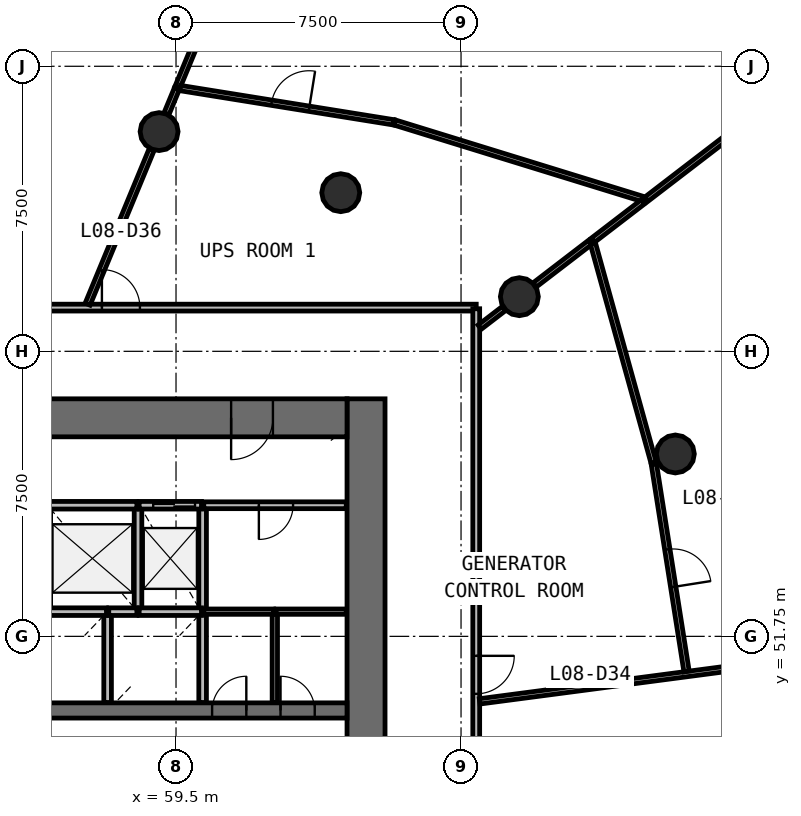
"""IFC4 building model, lengths in metres.
Left out: names, types, materials, properties, quantities, classifications, styles, units other than length and angle.
Written with IfcOpenShell. Run it as: python <this file> out.ifc"""

import sys

from ifc_helpers import new_model, si_unit, direction, frame, frame_2d, origin, origin_2d, place, context, subcontext, project, spatial, rectangle, circle, extrude, source, transform, mapped, element, fill, save


model = new_model("IFC4")
c1 = context("Model", 3, precision=1e-05, world=origin(), true_north=direction((0.0, 1.0)))
c2 = subcontext(c1, "Body", "Model", "MODEL_VIEW")
j1 = project(units=[si_unit("LENGTHUNIT", "METRE"), si_unit("PLANEANGLEUNIT", "RADIAN")], contexts=[c1])
p1 = place(None, origin())
s1 = spatial("IfcSite", under=j1, at=p1, CompositionType="ELEMENT")
p2 = place(p1, origin())
s2 = spatial("IfcBuilding", under=s1, at=p2, CompositionType="ELEMENT")
p3 = place(p2, frame((0.0, 0.0, 35.8)))
s3 = spatial("IfcBuildingStorey", under=s2, at=p3, CompositionType="ELEMENT", Elevation=35.8)
p4 = place(p3, frame((64.5, 38.0, 0.0), z_axis=(0.0, 0.0, 1.0), x_axis=(0.0, 1.0, 0.0)))
e1 = element("IfcWall", 1, at=p4, inside=s3, PredefinedType="SHEAR", context=c2, shape_type="SweptSolid", body=[
    extrude(rectangle(XDim=20.0, YDim=1.0, at=frame_2d((10.0, 0.0))), origin(), (0.0, 0.0, 1.0), 4.4),
])
p5 = place(p4, frame((9.1, 0.0, 0.0)))
e2 = element("IfcOpeningElement", 2, at=p5, cuts=e1, PredefinedType="OPENING", context=c2, shape_type="SweptSolid", body=[
    extrude(rectangle(XDim=1.8, YDim=2.1, at=frame_2d((0.9, 1.05))), frame((0.0, 0.51, 0.0), z_axis=(0.0, -1.0, 0.0), x_axis=(1.0, 0.0, 0.0)), (0.0, 0.0, 1.0), 1.02),
])
p6 = place(p3, frame((64.0, 57.5, 0.0), z_axis=(0.0, 0.0, 1.0), x_axis=(-1.0, 0.0, 0.0)))
e3 = element("IfcWall", 3, at=p6, inside=s3, PredefinedType="SHEAR", context=c2, shape_type="SweptSolid", body=[
    extrude(rectangle(XDim=24.0, YDim=1.0, at=frame_2d((12.0, 0.0))), origin(), (0.0, 0.0, 1.0), 4.4),
])
p7 = place(p6, frame((21.45, 0.0, 0.0)))
e4 = element("IfcOpeningElement", 4, at=p7, cuts=e3, PredefinedType="OPENING", context=c2, shape_type="SweptSolid", body=[
    extrude(rectangle(XDim=1.1, YDim=2.1, at=frame_2d((0.55, 1.05))), frame((0.0, 0.51, 0.0), z_axis=(0.0, -1.0, 0.0), x_axis=(1.0, 0.0, 0.0)), (0.0, 0.0, 1.0), 1.02),
])
p8 = place(p6, frame((1.95, 0.0, 0.0)))
e5 = element("IfcOpeningElement", 5, at=p8, cuts=e3, PredefinedType="OPENING", context=c2, shape_type="SweptSolid", body=[
    extrude(rectangle(XDim=1.1, YDim=2.1, at=frame_2d((0.55, 1.05))), frame((0.0, 0.51, 0.0), z_axis=(0.0, -1.0, 0.0), x_axis=(1.0, 0.0, 0.0)), (0.0, 0.0, 1.0), 1.02),
])
p9 = place(p3, frame((40.0, 49.8, 0.0), z_axis=(0.0, 0.0, 1.0), x_axis=(1.0, 0.0, 0.0)))
e6 = element("IfcWall", 6, at=p9, inside=s3, PredefinedType="SHEAR", context=c2, shape_type="SweptSolid", body=[
    extrude(rectangle(XDim=24.0, YDim=0.4, at=frame_2d((12.0, 0.0))), origin(), (0.0, 0.0, 1.0), 4.4),
])
p10 = place(p9, frame((4.5, 0.0, 0.0)))
e7 = element("IfcOpeningElement", 7, at=p10, cuts=e6, PredefinedType="OPENING", context=c2, shape_type="SweptSolid", body=[
    extrude(rectangle(XDim=1.1, YDim=2.1, at=frame_2d((0.55, 1.05))), frame((0.0, 0.21, 0.0), z_axis=(0.0, -1.0, 0.0), x_axis=(1.0, 0.0, 0.0)), (0.0, 0.0, 1.0), 0.42),
])
p11 = place(p9, frame((7.0, 0.0, 0.0)))
e8 = element("IfcOpeningElement", 8, at=p11, cuts=e6, PredefinedType="OPENING", context=c2, shape_type="SweptSolid", body=[
    extrude(rectangle(XDim=1.1, YDim=2.1, at=frame_2d((0.55, 1.05))), frame((0.0, 0.21, 0.0), z_axis=(0.0, -1.0, 0.0), x_axis=(1.0, 0.0, 0.0)), (0.0, 0.0, 1.0), 0.42),
])
p12 = place(p9, frame((9.5, 0.0, 0.0)))
e9 = element("IfcOpeningElement", 9, at=p12, cuts=e6, PredefinedType="OPENING", context=c2, shape_type="SweptSolid", body=[
    extrude(rectangle(XDim=1.1, YDim=2.1, at=frame_2d((0.55, 1.05))), frame((0.0, 0.21, 0.0), z_axis=(0.0, -1.0, 0.0), x_axis=(1.0, 0.0, 0.0)), (0.0, 0.0, 1.0), 0.42),
])
p13 = place(p9, frame((0.9, 0.0, 0.0)))
e10 = element("IfcOpeningElement", 10, at=p13, cuts=e6, PredefinedType="OPENING", context=c2, shape_type="SweptSolid", body=[
    extrude(rectangle(XDim=1.8, YDim=2.4, at=frame_2d((0.9, 1.2))), frame((0.0, 0.21, 0.0), z_axis=(0.0, -1.0, 0.0), x_axis=(1.0, 0.0, 0.0)), (0.0, 0.0, 1.0), 0.42),
])
p14 = place(p9, frame((20.45, 0.0, 0.0)))
e11 = element("IfcOpeningElement", 11, at=p14, cuts=e6, PredefinedType="OPENING", context=c2, shape_type="SweptSolid", body=[
    extrude(rectangle(XDim=0.9, YDim=2.1, at=frame_2d((0.45, 1.05))), frame((0.0, 0.21, 0.0), z_axis=(0.0, -1.0, 0.0), x_axis=(1.0, 0.0, 0.0)), (0.0, 0.0, 1.0), 0.42),
])
p15 = place(p9, frame((22.25, 0.0, 0.0)))
e12 = element("IfcOpeningElement", 12, at=p15, cuts=e6, PredefinedType="OPENING", context=c2, shape_type="SweptSolid", body=[
    extrude(rectangle(XDim=0.9, YDim=2.1, at=frame_2d((0.45, 1.05))), frame((0.0, 0.21, 0.0), z_axis=(0.0, -1.0, 0.0), x_axis=(1.0, 0.0, 0.0)), (0.0, 0.0, 1.0), 0.42),
])
p16 = place(p9, frame((11.65, 0.0, 0.0)))
e13 = element("IfcOpeningElement", 13, at=p16, cuts=e6, PredefinedType="OPENING", context=c2, shape_type="SweptSolid", body=[
    extrude(rectangle(XDim=0.9, YDim=2.1, at=frame_2d((0.45, 1.05))), frame((0.0, 0.21, 0.0), z_axis=(0.0, -1.0, 0.0), x_axis=(1.0, 0.0, 0.0)), (0.0, 0.0, 1.0), 0.42),
])
m1 = source(origin(), c2, "Body", "SweptSolid", [
    extrude(circle(Radius=0.5, at=origin_2d()), origin(), (0.0, 0.0, 1.0), 4.4),
])
for number, where, z_axis, x_axis in (
    (14, (72.639, 56.549, 0.0), (0.0, 0.0, 1.0), (1.0, 0.0, 0.0)),
    (15, (68.535, 60.688, 0.0), (0.0, 0.0, 1.0), (1.0, 0.0, 0.0)),
    (16, (63.835, 63.424, 0.0), (0.0, 0.0, 1.0), (1.0, 0.0, 0.0)),
    (17, (59.055, 65.031, 0.0), (0.0, 0.0, 1.0), (1.0, 0.0, 0.0)),
):
    element("IfcColumn", number, at=place(p3, frame(where, z_axis=z_axis, x_axis=x_axis)), inside=s3, PredefinedType="COLUMN", context=c2, shape_type="MappedRepresentation", body=[
        mapped(m1, transform((0.0, 0.0, 0.0), scale=1.0)),
    ])
for number, where, z_axis, x_axis in (
    (18, (58.5, 52.4, 0.0), (0.0, 0.0, 1.0), (0.0, 1.0, 0.0)),
    (19, (60.2, 52.4, 0.0), (0.0, 0.0, 1.0), (0.0, 1.0, 0.0)),
):
    element("IfcWall", number, at=place(p3, frame(where, z_axis=z_axis, x_axis=x_axis)), inside=s3, PredefinedType="SOLIDWALL", context=c2, shape_type="SweptSolid", body=[
        extrude(rectangle(XDim=2.8, YDim=0.2, at=frame_2d((1.4, 0.0))), origin(), (0.0, 0.0, 1.0), 3.95),
    ])
p17 = place(p3, frame((58.47, 55.2, 0.0), z_axis=(0.0, 0.0, 1.0), x_axis=(-1.0, 0.0, 0.0)))
e20 = element("IfcWall", 20, at=p17, inside=s3, PredefinedType="SOLIDWALL", context=c2, shape_type="SweptSolid", body=[
    extrude(rectangle(XDim=2.34, YDim=0.2, at=frame_2d((1.17, 0.0))), origin(), (0.0, 0.0, 1.0), 3.95),
])
p18 = place(p3, frame((57.7, 50.01, 0.0), z_axis=(0.0, 0.0, 1.0), x_axis=(0.0, 1.0, 0.0)))
e21 = element("IfcWall", 21, at=p18, inside=s3, PredefinedType="SOLIDWALL", context=c2, shape_type="SweptSolid", body=[
    extrude(rectangle(XDim=2.39, YDim=0.2, at=frame_2d((1.195, 0.0))), origin(), (0.0, 0.0, 1.0), 3.95),
])
p19 = place(p3, frame((60.2, 50.01, 0.0), z_axis=(0.0, 0.0, 1.0), x_axis=(0.0, 1.0, 0.0)))
e22 = element("IfcWall", 22, at=p19, inside=s3, PredefinedType="SOLIDWALL", context=c2, shape_type="SweptSolid", body=[
    extrude(rectangle(XDim=2.36, YDim=0.2, at=frame_2d((1.18, 0.0))), origin(), (0.0, 0.0, 1.0), 3.95),
])
p20 = place(p3, frame((60.17, 52.4, 0.0), z_axis=(0.0, 0.0, 1.0), x_axis=(-1.0, 0.0, 0.0)))
e23 = element("IfcWall", 23, at=p20, inside=s3, PredefinedType="SOLIDWALL", context=c2, shape_type="SweptSolid", body=[
    extrude(rectangle(XDim=1.64, YDim=0.2, at=frame_2d((0.82, 0.0))), origin(), (0.0, 0.0, 1.0), 3.95),
])
p21 = place(p3, frame((60.17, 55.2, 0.0), z_axis=(0.0, 0.0, 1.0), x_axis=(-1.0, 0.0, 0.0)))
e24 = element("IfcWall", 24, at=p21, inside=s3, PredefinedType="SOLIDWALL", context=c2, shape_type="SweptSolid", body=[
    extrude(rectangle(XDim=1.64, YDim=0.2, at=frame_2d((0.82, 0.0))), origin(), (0.0, 0.0, 1.0), 3.95),
])
p22 = place(p21, frame((0.17, 0.0, 0.0)))
e25 = element("IfcOpeningElement", 25, at=p22, cuts=e24, PredefinedType="OPENING", context=c2, shape_type="SweptSolid", body=[
    extrude(rectangle(XDim=1.1, YDim=2.1, at=frame_2d((0.55, 1.05))), frame((0.0, 0.11, 0.0), z_axis=(0.0, -1.0, 0.0), x_axis=(1.0, 0.0, 0.0)), (0.0, 0.0, 1.0), 0.22),
])
p23 = place(p3, frame((57.67, 52.4, 0.0), z_axis=(0.0, 0.0, 1.0), x_axis=(-1.0, 0.0, 0.0)))
e26 = element("IfcWall", 26, at=p23, inside=s3, PredefinedType="SOLIDWALL", context=c2, shape_type="SweptSolid", body=[
    extrude(rectangle(XDim=1.54, YDim=0.2, at=frame_2d((0.77, 0.0))), origin(), (0.0, 0.0, 1.0), 3.95),
])
p24 = place(p3, frame((58.47, 52.4, 0.0), z_axis=(0.0, 0.0, 1.0), x_axis=(-1.0, 0.0, 0.0)))
e27 = element("IfcWall", 27, at=p24, inside=s3, PredefinedType="SOLIDWALL", context=c2, shape_type="SweptSolid", body=[
    extrude(rectangle(XDim=0.74, YDim=0.2, at=frame_2d((0.37, 0.0))), origin(), (0.0, 0.0, 1.0), 3.95),
])
p25 = place(p3, frame((36.6, 60.4, 0.0), z_axis=(0.0, 0.0, 1.0), x_axis=(1.0, 0.0, 0.0)))
e28 = element("IfcWall", 28, at=p25, inside=s3, PredefinedType="PARTITIONING", context=c2, shape_type="SweptSolid", body=[
    extrude(rectangle(XDim=30.8, YDim=0.18, at=frame_2d((15.4, 0.0))), origin(), (0.0, 0.0, 1.0), 3.05),
])
p26 = place(p25, frame((20.95, 0.0, 0.0)))
e29 = element("IfcOpeningElement", 29, at=p26, cuts=e28, PredefinedType="OPENING", context=c2, shape_type="SweptSolid", body=[
    extrude(rectangle(XDim=1.0, YDim=2.1, at=frame_2d((0.5, 1.05))), frame((0.0, 0.1, 0.0), z_axis=(0.0, -1.0, 0.0), x_axis=(1.0, 0.0, 0.0)), (0.0, 0.0, 1.0), 0.2),
])
p27 = place(p25, frame((14.95, 0.0, 0.0)))
e30 = element("IfcOpeningElement", 30, at=p27, cuts=e28, PredefinedType="OPENING", context=c2, shape_type="SweptSolid", body=[
    extrude(rectangle(XDim=1.0, YDim=2.1, at=frame_2d((0.5, 1.05))), frame((0.0, 0.1, 0.0), z_axis=(0.0, -1.0, 0.0), x_axis=(1.0, 0.0, 0.0)), (0.0, 0.0, 1.0), 0.2),
])
p28 = place(p3, frame((67.4, 60.37, 0.0), z_axis=(0.0, 0.0, 1.0), x_axis=(0.0, -1.0, 0.0)))
e31 = element("IfcWall", 31, at=p28, inside=s3, PredefinedType="PARTITIONING", context=c2, shape_type="SweptSolid", body=[
    extrude(rectangle(XDim=23.583, YDim=0.18, at=frame_2d((11.791, 0.0))), origin(), (0.0, 0.0, 1.0), 3.05),
])
p29 = place(p28, frame((11.333, 0.0, 0.0)))
e32 = element("IfcOpeningElement", 32, at=p29, cuts=e31, PredefinedType="OPENING", context=c2, shape_type="SweptSolid", body=[
    extrude(rectangle(XDim=1.0, YDim=2.1, at=frame_2d((0.5, 1.05))), frame((0.0, 0.1, 0.0), z_axis=(0.0, -1.0, 0.0), x_axis=(1.0, 0.0, 0.0)), (0.0, 0.0, 1.0), 0.2),
])
p30 = place(p28, frame((9.133, 0.0, 0.0)))
e33 = element("IfcOpeningElement", 33, at=p30, cuts=e31, PredefinedType="OPENING", context=c2, shape_type="SweptSolid", body=[
    extrude(rectangle(XDim=1.0, YDim=2.1, at=frame_2d((0.5, 1.05))), frame((0.0, 0.1, 0.0), z_axis=(0.0, -1.0, 0.0), x_axis=(1.0, 0.0, 0.0)), (0.0, 0.0, 1.0), 0.2),
])
p31 = place(p3, frame((63.98, 55.2, 0.0), z_axis=(0.0, 0.0, 1.0), x_axis=(-1.0, 0.0, 0.0)))
e34 = element("IfcWall", 34, at=p31, inside=s3, PredefinedType="PARTITIONING", context=c2, shape_type="SweptSolid", body=[
    extrude(rectangle(XDim=3.75, YDim=0.18, at=frame_2d((1.875, 0.0))), origin(), (0.0, 0.0, 1.0), 3.95),
])
p32 = place(p31, frame((1.4, 0.0, 0.0)))
e35 = element("IfcOpeningElement", 35, at=p32, cuts=e34, PredefinedType="OPENING", context=c2, shape_type="SweptSolid", body=[
    extrude(rectangle(XDim=0.9, YDim=2.1, at=frame_2d((0.45, 1.05))), frame((0.0, 0.1, 0.0), z_axis=(0.0, -1.0, 0.0), x_axis=(1.0, 0.0, 0.0)), (0.0, 0.0, 1.0), 0.2),
])
p33 = place(p3, frame((59.534, 66.189, 0.0), z_axis=(0.0, 0.0, 1.0), x_axis=(0.382683346226, 0.923879568191, 0.0)))
e36 = element("IfcWall", 36, at=p33, inside=s3, PredefinedType="PARTITIONING", context=c2, shape_type="SweptSolid", body=[
    extrude(rectangle(XDim=8.411, YDim=0.14, at=frame_2d((4.206, 0.0))), origin(), (0.0, 0.0, 1.0), 3.05),
])
p34 = place(p3, frame((74.534, 50.967, 0.0), z_axis=(0.0, 0.0, 1.0), x_axis=(-0.99144622305, -0.130515848849, 0.0)))
e37 = element("IfcWall", 37, at=p34, inside=s3, PredefinedType="PARTITIONING", context=c2, shape_type="SweptSolid", body=[
    extrude(rectangle(XDim=7.104, YDim=0.14, at=frame_2d((3.552, 0.0))), origin(), (0.0, 0.0, 1.0), 3.05),
])
p35 = place(p3, frame((71.855, 63.236, 0.0), z_axis=(0.0, 0.0, 1.0), x_axis=(-0.955628382182, 0.294574939816, 0.0)))
e38 = element("IfcWall", 38, at=p35, inside=s3, PredefinedType="PARTITIONING", context=c2, shape_type="SweptSolid", body=[
    extrude(rectangle(XDim=6.91, YDim=0.14, at=frame_2d((3.455, 0.0))), origin(), (0.0, 0.0, 1.0), 3.05),
])
p36 = place(p3, frame((71.879, 63.254, 0.0), z_axis=(0.0, 0.0, 1.0), x_axis=(0.793367765852, 0.60874262879, 0.0)))
e39 = element("IfcWall", 39, at=p36, inside=s3, PredefinedType="PARTITIONING", context=c2, shape_type="SweptSolid", body=[
    extrude(rectangle(XDim=6.803, YDim=0.14, at=frame_2d((3.402, 0.0))), origin(), (0.0, 0.0, 1.0), 3.05),
])
p37 = place(p3, frame((72.069, 56.313, 0.0), z_axis=(0.0, 0.0, 1.0), x_axis=(-0.26694408294, 0.963712019528, 0.0)))
e40 = element("IfcWall", 40, at=p37, inside=s3, PredefinedType="PARTITIONING", context=c2, shape_type="SweptSolid", body=[
    extrude(rectangle(XDim=6.064, YDim=0.14, at=frame_2d((3.032, 0.0))), origin(), (0.0, 0.0, 1.0), 3.05),
])
p38 = place(p3, frame((59.605, 66.178, 0.0), z_axis=(0.0, 0.0, 1.0), x_axis=(0.987350770866, -0.158551112488, 0.0)))
e41 = element("IfcWall", 41, at=p38, inside=s3, PredefinedType="PARTITIONING", context=c2, shape_type="SweptSolid", body=[
    extrude(rectangle(XDim=5.69, YDim=0.14, at=frame_2d((2.845, 0.0))), origin(), (0.0, 0.0, 1.0), 3.05),
])
p39 = place(p38, frame((2.44, 0.0, 0.0)))
e42 = element("IfcOpeningElement", 42, at=p39, cuts=e41, PredefinedType="OPENING", context=c2, shape_type="SweptSolid", body=[
    extrude(rectangle(XDim=1.0, YDim=2.1, at=frame_2d((0.5, 1.05))), frame((0.0, 0.08, 0.0), z_axis=(0.0, -1.0, 0.0), x_axis=(1.0, 0.0, 0.0)), (0.0, 0.0, 1.0), 0.16),
])
p40 = place(p3, frame((72.074, 56.283, 0.0), z_axis=(0.0, 0.0, 1.0), x_axis=(0.155785554146, -0.987790899492, 0.0)))
e43 = element("IfcWall", 43, at=p40, inside=s3, PredefinedType="PARTITIONING", context=c2, shape_type="SweptSolid", body=[
    extrude(rectangle(XDim=5.524, YDim=0.14, at=frame_2d((2.762, 0.0))), origin(), (0.0, 0.0, 1.0), 3.05),
])
p41 = place(p40, frame((2.274, 0.0, 0.0)))
e44 = element("IfcOpeningElement", 44, at=p41, cuts=e43, PredefinedType="OPENING", context=c2, shape_type="SweptSolid", body=[
    extrude(rectangle(XDim=1.0, YDim=2.1, at=frame_2d((0.5, 1.05))), frame((0.0, 0.08, 0.0), z_axis=(0.0, -1.0, 0.0), x_axis=(1.0, 0.0, 0.0)), (0.0, 0.0, 1.0), 0.16),
])
p42 = place(p3, frame((57.174, 60.49, 0.0), z_axis=(0.0, 0.0, 1.0), x_axis=(0.382672831764, 0.923883923353, 0.0)))
e45 = element("IfcWall", 45, at=p42, inside=s3, PredefinedType="PARTITIONING", context=c2, shape_type="SweptSolid", body=[
    extrude(rectangle(XDim=4.41, YDim=0.14, at=frame_2d((2.205, 0.0))), origin(), (0.0, 0.0, 1.0), 3.05),
])
p43 = place(p3, frame((59.248, 65.498, 0.0), z_axis=(0.0, 0.0, 1.0), x_axis=(0.38261188646, 0.92390916455, 0.0)))
e46 = element("IfcWall", 46, at=p43, inside=s3, PredefinedType="PARTITIONING", context=c2, shape_type="SweptSolid", body=[
    extrude(rectangle(XDim=0.719, YDim=0.14, at=frame_2d((0.359, 0.0))), origin(), (0.0, 0.0, 1.0), 3.05),
])
p44 = place(p3, frame((62.1, 50.01, 0.0), z_axis=(0.0, 0.0, 1.0), x_axis=(0.0, 1.0, 0.0)))
e47 = element("IfcWall", 47, at=p44, inside=s3, PredefinedType="PARTITIONING", context=c2, shape_type="SweptSolid", body=[
    extrude(rectangle(XDim=2.39, YDim=0.14, at=frame_2d((1.195, 0.0))), origin(), (0.0, 0.0, 1.0), 3.05),
])
p45 = place(p3, frame((68.935, 60.995, 0.0), z_axis=(0.0, 0.0, 1.0), x_axis=(0.793340711993, 0.608777886174, 0.0)))
e48 = element("IfcWall", 48, at=p45, inside=s3, PredefinedType="PARTITIONING", context=c2, shape_type="SweptSolid", body=[
    extrude(rectangle(XDim=1.835, YDim=0.14, at=frame_2d((0.917, 0.0))), origin(), (0.0, 0.0, 1.0), 3.05),
])
p46 = place(p3, frame((62.07, 52.4, 0.0), z_axis=(0.0, 0.0, 1.0), x_axis=(-1.0, 0.0, 0.0)))
e49 = element("IfcWall", 49, at=p46, inside=s3, PredefinedType="PARTITIONING", context=c2, shape_type="SweptSolid", body=[
    extrude(rectangle(XDim=1.84, YDim=0.14, at=frame_2d((0.92, 0.0))), origin(), (0.0, 0.0, 1.0), 3.05),
])
p47 = place(p3, frame((63.98, 52.4, 0.0), z_axis=(0.0, 0.0, 1.0), x_axis=(-1.0, 0.0, 0.0)))
e50 = element("IfcWall", 50, at=p47, inside=s3, PredefinedType="PARTITIONING", context=c2, shape_type="SweptSolid", body=[
    extrude(rectangle(XDim=1.85, YDim=0.14, at=frame_2d((0.925, 0.0))), origin(), (0.0, 0.0, 1.0), 3.05),
])
p48 = place(p3, frame((70.474, 62.176, 0.0), z_axis=(0.0, 0.0, 1.0), x_axis=(0.793330865264, 0.608790717915, 0.0)))
e51 = element("IfcWall", 51, at=p48, inside=s3, PredefinedType="PARTITIONING", context=c2, shape_type="SweptSolid", body=[
    extrude(rectangle(XDim=1.655, YDim=0.14, at=frame_2d((0.828, 0.0))), origin(), (0.0, 0.0, 1.0), 3.05),
])
p49 = place(p3, frame((67.49, 59.886, 0.0), z_axis=(0.0, 0.0, 1.0), x_axis=(0.793316076519, 0.608809989025, 0.0)))
e52 = element("IfcWall", 52, at=p49, inside=s3, PredefinedType="PARTITIONING", context=c2, shape_type="SweptSolid", body=[
    extrude(rectangle(XDim=0.812, YDim=0.14, at=frame_2d((0.406, 0.0))), origin(), (0.0, 0.0, 1.0), 3.05),
])
m2 = source(origin(), c2, "Body", "SweptSolid", [
    extrude(rectangle(XDim=1.1, YDim=2.1, at=frame_2d((0.55, 1.05))), frame((0.0, 0.025, 0.0), z_axis=(0.0, -1.0, 0.0), x_axis=(1.0, 0.0, 0.0)), (0.0, 0.0, 1.0), 0.05),
])
p50 = place(p22, origin())
e53 = element("IfcDoor", 53, at=p50, inside=s3, OperationType="DOUBLE_DOOR_SLIDING", PredefinedType="USERDEFINED", context=c2, shape_type="MappedRepresentation", body=[
    mapped(m2, transform((0.0, 0.0, 0.0), scale=1.0)),
])
fill(e25, e53)
m3 = source(origin(), c2, "Body", "SweptSolid", [
    extrude(rectangle(XDim=1.1, YDim=2.1, at=frame_2d((0.55, 1.05))), frame((0.0, 0.025, 0.0), z_axis=(0.0, -1.0, 0.0), x_axis=(1.0, 0.0, 0.0)), (0.0, 0.0, 1.0), 0.05),
])
p51 = place(p8, origin())
e54 = element("IfcDoor", 54, at=p51, inside=s3, OperationType="SINGLE_SWING_RIGHT", PredefinedType="DOOR", context=c2, shape_type="MappedRepresentation", body=[
    mapped(m3, transform((0.0, 0.0, 0.0), scale=1.0)),
])
fill(e5, e54)
m4 = source(origin(), c2, "Body", "SweptSolid", [
    extrude(rectangle(XDim=1.0, YDim=2.1, at=frame_2d((0.5, 1.05))), frame((0.0, 0.025, 0.0), z_axis=(0.0, -1.0, 0.0), x_axis=(1.0, 0.0, 0.0)), (0.0, 0.0, 1.0), 0.05),
])
p52 = place(p30, origin())
e55 = element("IfcDoor", 55, at=p52, inside=s3, OperationType="SINGLE_SWING_LEFT", PredefinedType="DOOR", context=c2, shape_type="MappedRepresentation", body=[
    mapped(m4, transform((0.0, 0.0, 0.0), scale=1.0)),
])
fill(e33, e55)
p53 = place(p41, origin())
e56 = element("IfcDoor", 56, at=p53, inside=s3, OperationType="SINGLE_SWING_RIGHT", PredefinedType="DOOR", context=c2, shape_type="MappedRepresentation", body=[
    mapped(m4, transform((0.0, 0.0, 0.0), scale=1.0)),
])
fill(e44, e56)
p54 = place(p26, origin())
e57 = element("IfcDoor", 57, at=p54, inside=s3, OperationType="SINGLE_SWING_LEFT", PredefinedType="DOOR", context=c2, shape_type="MappedRepresentation", body=[
    mapped(m4, transform((0.0, 0.0, 0.0), scale=1.0)),
])
fill(e29, e57)
p55 = place(p39, origin())
e58 = element("IfcDoor", 58, at=p55, inside=s3, OperationType="SINGLE_SWING_RIGHT", PredefinedType="DOOR", context=c2, shape_type="MappedRepresentation", body=[
    mapped(m4, transform((0.0, 0.0, 0.0), scale=1.0)),
])
fill(e42, e58)
m5 = source(origin(), c2, "Body", "SweptSolid", [
    extrude(rectangle(XDim=0.9, YDim=2.1, at=frame_2d((0.45, 1.05))), frame((0.0, 0.025, 0.0), z_axis=(0.0, -1.0, 0.0), x_axis=(1.0, 0.0, 0.0)), (0.0, 0.0, 1.0), 0.05),
])
p56 = place(p14, origin())
e59 = element("IfcDoor", 59, at=p56, inside=s3, OperationType="SINGLE_SWING_RIGHT", PredefinedType="DOOR", context=c2, shape_type="MappedRepresentation", body=[
    mapped(m5, transform((0.0, 0.0, 0.0), scale=1.0)),
])
fill(e11, e59)
p57 = place(p15, origin())
e60 = element("IfcDoor", 60, at=p57, inside=s3, OperationType="SINGLE_SWING_LEFT", PredefinedType="DOOR", context=c2, shape_type="MappedRepresentation", body=[
    mapped(m5, transform((0.0, 0.0, 0.0), scale=1.0)),
])
fill(e12, e60)
p58 = place(p32, origin())
e61 = element("IfcDoor", 61, at=p58, inside=s3, OperationType="SINGLE_SWING_RIGHT", PredefinedType="DOOR", context=c2, shape_type="MappedRepresentation", body=[
    mapped(m5, transform((0.0, 0.0, 0.0), scale=1.0)),
])
fill(e35, e61)
save(model, sys.argv[1])
